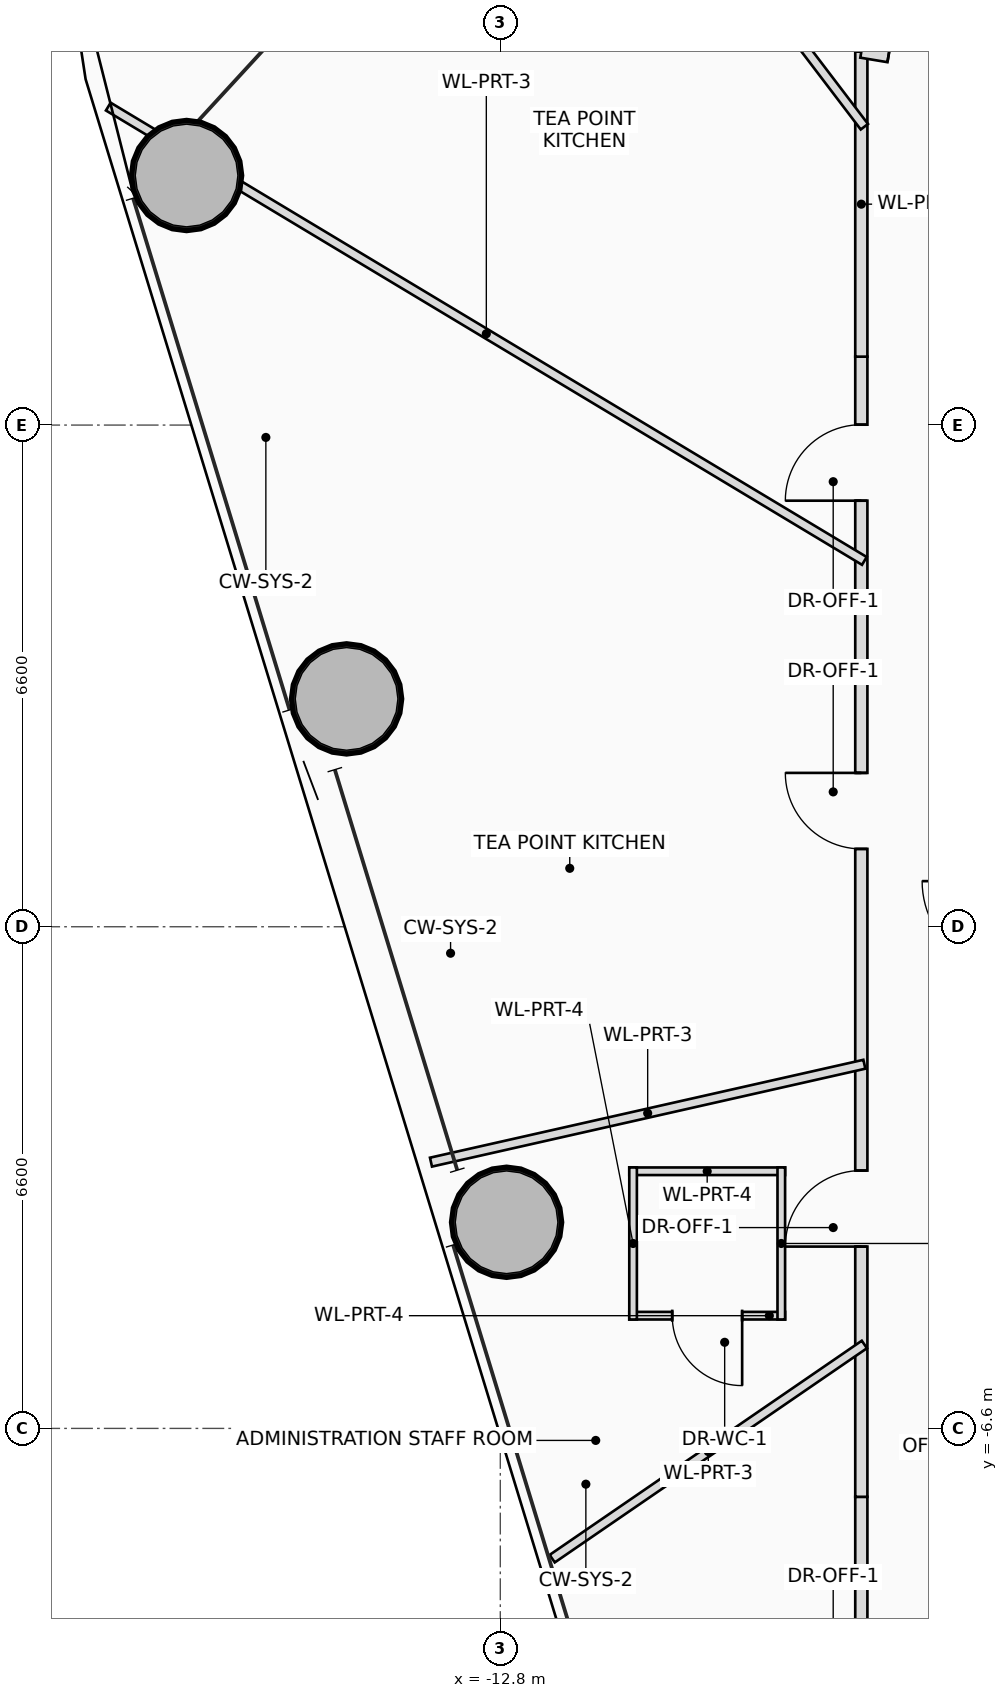
"""IFC4 building model, lengths in metres.
Left out: names, types, materials, properties, quantities, classifications, styles, units other than length and angle.
Written with IfcOpenShell. Run it as: python <this file> out.ifc"""

import sys

from ifc_helpers import new_model, si_unit, direction, frame, frame_2d, origin, origin_2d, place, context, subcontext, project, spatial, rectangle, hollow_circle, extrude, source, transform, mapped, element, fill, save


model = new_model("IFC4")
c1 = context("Model", 3, precision=1e-05, world=origin(), true_north=direction((0.0, 1.0)))
c2 = subcontext(c1, "Body", "Model", "MODEL_VIEW")
j1 = project(units=[si_unit("LENGTHUNIT", "METRE"), si_unit("PLANEANGLEUNIT", "RADIAN")], contexts=[c1])
p1 = place(None, origin())
s1 = spatial("IfcSite", under=j1, at=p1, CompositionType="ELEMENT")
p2 = place(p1, origin())
s2 = spatial("IfcBuilding", under=s1, at=p2, CompositionType="ELEMENT")
p3 = place(p2, frame((0.0, 0.0, 97.4)))
s3 = spatial("IfcBuildingStorey", under=s2, at=p3, CompositionType="ELEMENT", Elevation=97.4)
m1 = source(origin(), c2, "Body", "SweptSolid", [
    extrude(hollow_circle(Radius=0.725, WallThickness=0.05, at=origin_2d()), origin(), (0.0, 0.0, 1.0), 3.75),
])
for number, where, z_axis, x_axis in (
    (1, (-16.927, 9.883, 0.0), (0.0, 0.0, 1.0), (1.0, 0.0, 0.0)),
    (2, (-14.823, 2.998, 0.0), (0.0, 0.0, 1.0), (1.0, 0.0, 0.0)),
    (3, (-12.717, -3.888, 0.0), (0.0, 0.0, 1.0), (1.0, 0.0, 0.0)),
):
    element("IfcColumn", number, at=place(p3, frame(where, z_axis=z_axis, x_axis=x_axis)), inside=s3, PredefinedType="COLUMN", context=c2, shape_type="MappedRepresentation", body=[
        mapped(m1, transform((0.0, 0.0, 0.0), scale=1.0)),
    ])
p4 = place(p3, frame((-11.103, -3.217, 0.0), z_axis=(0.0, 0.0, 1.0), x_axis=(1.0, 0.0, 0.0)))
e4 = element("IfcWall", 4, at=p4, inside=s3, PredefinedType="PARTITIONING", context=c2, shape_type="SweptSolid", body=[
    extrude(rectangle(XDim=2.05, YDim=0.1, at=frame_2d((1.025, 0.0))), origin(), (0.0, 0.0, 1.0), 3.05),
])
p5 = place(p3, frame((-9.053, -5.117, 0.0), z_axis=(0.0, 0.0, 1.0), x_axis=(-1.0, 0.0, 0.0)))
e5 = element("IfcWall", 5, at=p5, inside=s3, PredefinedType="PARTITIONING", context=c2, shape_type="SweptSolid", body=[
    extrude(rectangle(XDim=2.05, YDim=0.1, at=frame_2d((1.025, 0.0))), origin(), (0.0, 0.0, 1.0), 3.05),
])
p6 = place(p5, frame((0.565, 0.0, 0.0)))
e6 = element("IfcOpeningElement", 6, at=p6, cuts=e5, PredefinedType="OPENING", context=c2, shape_type="SweptSolid", body=[
    extrude(rectangle(XDim=0.92, YDim=2.1, at=frame_2d((0.46, 1.05))), frame((0.0, 0.06, 0.0), z_axis=(0.0, -1.0, 0.0), x_axis=(1.0, 0.0, 0.0)), (0.0, 0.0, 1.0), 0.12),
])
for number, where, z_axis, x_axis in (
    (7, (-9.103, -3.167, 0.0), (0.0, 0.0, 1.0), (0.0, -1.0, 0.0)),
    (8, (-11.053, -5.167, 0.0), (0.0, 0.0, 1.0), (0.0, 1.0, 0.0)),
):
    element("IfcWall", number, at=place(p3, frame(where, z_axis=z_axis, x_axis=x_axis)), inside=s3, PredefinedType="PARTITIONING", context=c2, shape_type="SweptSolid", body=[
        extrude(rectangle(XDim=2.0, YDim=0.1, at=frame_2d((1.0, 0.0))), origin(), (0.0, 0.0, 1.0), 2.85),
    ])
p7 = place(p3, frame((-8.05, -13.271, 0.0), z_axis=(0.0, 0.0, 1.0), x_axis=(0.0, 1.0, 0.0)))
e9 = element("IfcWall", 9, at=p7, inside=s3, PredefinedType="PARTITIONING", context=c2, shape_type="SweptSolid", body=[
    extrude(rectangle(XDim=5.771, YDim=0.16, at=frame_2d((2.885, 0.0))), origin(), (0.0, 0.0, 1.0), 2.85),
])
p8 = place(p7, frame((2.385, 0.0, 0.0)))
e10 = element("IfcOpeningElement", 10, at=p8, cuts=e9, PredefinedType="OPENING", context=c2, shape_type="SweptSolid", body=[
    extrude(rectangle(XDim=1.0, YDim=2.25, at=frame_2d((0.5, 1.125))), frame((0.0, 0.09, 0.0), z_axis=(0.0, -1.0, 0.0), x_axis=(1.0, 0.0, 0.0)), (0.0, 0.0, 1.0), 0.18),
])
p9 = place(p3, frame((-8.05, -7.5, 0.0), z_axis=(0.0, 0.0, 1.0), x_axis=(0.0, 1.0, 0.0)))
e11 = element("IfcWall", 11, at=p9, inside=s3, PredefinedType="PARTITIONING", context=c2, shape_type="SweptSolid", body=[
    extrude(rectangle(XDim=15.0, YDim=0.16, at=frame_2d((7.5, 0.0))), origin(), (0.0, 0.0, 1.0), 2.85),
])
p10 = place(p9, frame((3.292, 0.0, 0.0)))
e12 = element("IfcOpeningElement", 12, at=p10, cuts=e11, PredefinedType="OPENING", context=c2, shape_type="SweptSolid", body=[
    extrude(rectangle(XDim=1.0, YDim=2.25, at=frame_2d((0.5, 1.125))), frame((0.0, 0.09, 0.0), z_axis=(0.0, -1.0, 0.0), x_axis=(1.0, 0.0, 0.0)), (0.0, 0.0, 1.0), 0.18),
])
p11 = place(p9, frame((8.524, 0.0, 0.0)))
e13 = element("IfcOpeningElement", 13, at=p11, cuts=e11, PredefinedType="OPENING", context=c2, shape_type="SweptSolid", body=[
    extrude(rectangle(XDim=1.0, YDim=2.25, at=frame_2d((0.5, 1.125))), frame((0.0, 0.09, 0.0), z_axis=(0.0, -1.0, 0.0), x_axis=(1.0, 0.0, 0.0)), (0.0, 0.0, 1.0), 0.18),
])
p12 = place(p9, frame((13.105, 0.0, 0.0)))
e14 = element("IfcOpeningElement", 14, at=p12, cuts=e11, PredefinedType="OPENING", context=c2, shape_type="SweptSolid", body=[
    extrude(rectangle(XDim=1.0, YDim=2.25, at=frame_2d((0.5, 1.125))), frame((0.0, 0.09, 0.0), z_axis=(0.0, -1.0, 0.0), x_axis=(1.0, 0.0, 0.0)), (0.0, 0.0, 1.0), 0.18),
])
p13 = place(p3, frame((-8.05, 7.5, 0.0), z_axis=(0.0, 0.0, 1.0), x_axis=(0.0, 1.0, 0.0)))
e15 = element("IfcWall", 15, at=p13, inside=s3, PredefinedType="PARTITIONING", context=c2, shape_type="SweptSolid", body=[
    extrude(rectangle(XDim=4.012, YDim=0.16, at=frame_2d((2.006, 0.0))), origin(), (0.0, 0.0, 1.0), 2.85),
])
p14 = place(p3, frame((-8.05, 11.512, 0.0), z_axis=(0.0, 0.0, 1.0), x_axis=(0.986405407683, -0.164330069354, 0.0)))
e16 = element("IfcWall", 16, at=p14, inside=s3, PredefinedType="PARTITIONING", context=c2, shape_type="SweptSolid", body=[
    extrude(rectangle(XDim=1.723, YDim=0.16, at=frame_2d((0.862, 0.0))), origin(), (0.0, 0.0, 1.0), 3.545),
])
p15 = place(p14, frame((0.362, 0.0, 0.0)))
e17 = element("IfcOpeningElement", 17, at=p15, cuts=e16, PredefinedType="OPENING", context=c2, shape_type="SweptSolid", body=[
    extrude(rectangle(XDim=1.0, YDim=2.25, at=frame_2d((0.5, 1.125))), frame((0.0, 0.09, 0.0), z_axis=(0.0, -1.0, 0.0), x_axis=(1.0, 0.0, 0.0)), (0.0, 0.0, 1.0), 0.18),
])
p16 = place(p3, frame((-8.01, 4.813, 0.0), z_axis=(0.0, 0.0, 1.0), x_axis=(-0.857173493242, 0.515027768653, 0.0)))
e18 = element("IfcWall", 18, at=p16, inside=s3, PredefinedType="PARTITIONING", context=c2, shape_type="SweptSolid", body=[
    extrude(rectangle(XDim=11.605, YDim=0.12, at=frame_2d((5.803, 0.0))), origin(), (0.0, 0.0, 1.0), 2.85),
])
p17 = place(p3, frame((-8.01, -1.809, 0.0), z_axis=(0.0, 0.0, 1.0), x_axis=(-0.975429422211, -0.220312147384, 0.0)))
e19 = element("IfcWall", 19, at=p17, inside=s3, PredefinedType="PARTITIONING", context=c2, shape_type="SweptSolid", body=[
    extrude(rectangle(XDim=5.845, YDim=0.12, at=frame_2d((2.923, 0.0))), origin(), (0.0, 0.0, 1.0), 3.01),
])
p18 = place(p3, frame((-8.01, -5.496, 0.0), z_axis=(0.0, 0.0, 1.0), x_axis=(-0.824586433319, -0.565735993186, 0.0)))
e20 = element("IfcWall", 20, at=p18, inside=s3, PredefinedType="PARTITIONING", context=c2, shape_type="SweptSolid", body=[
    extrude(rectangle(XDim=4.981, YDim=0.12, at=frame_2d((2.49, 0.0))), origin(), (0.0, 0.0, 1.0), 3.01),
])
p19 = place(p3, frame((-8.01, 10.525, 0.0), z_axis=(0.0, 0.0, 1.0), x_axis=(-0.605587414203, 0.79577879072, 0.0)))
e21 = element("IfcWall", 21, at=p19, inside=s3, PredefinedType="PARTITIONING", context=c2, shape_type="SweptSolid", body=[
    extrude(rectangle(XDim=4.972, YDim=0.12, at=frame_2d((2.486, 0.0))), origin(), (0.0, 0.0, 1.0), 3.01),
])
p20 = place(p6, origin())
e22 = element("IfcDoor", 22, at=p20, inside=s3, OperationType="SINGLE_SWING_LEFT", PredefinedType="DOOR", context=c2, shape_type="SweptSolid", body=[
    extrude(rectangle(XDim=0.92, YDim=2.1, at=frame_2d((0.46, 1.05))), frame((0.0, 0.025, 0.0), z_axis=(0.0, -1.0, 0.0), x_axis=(1.0, 0.0, 0.0)), (0.0, 0.0, 1.0), 0.05),
])
fill(e6, e22)
p21 = place(p10, origin())
e23 = element("IfcDoor", 23, at=p21, inside=s3, OperationType="SINGLE_SWING_LEFT", PredefinedType="DOOR", context=c2, shape_type="SweptSolid", body=[
    extrude(rectangle(XDim=1.0, YDim=2.25, at=frame_2d((0.5, 1.125))), frame((0.0, 0.025, 0.0), z_axis=(0.0, -1.0, 0.0), x_axis=(1.0, 0.0, 0.0)), (0.0, 0.0, 1.0), 0.05),
])
fill(e12, e23)
p22 = place(p11, origin())
e24 = element("IfcDoor", 24, at=p22, inside=s3, OperationType="SINGLE_SWING_RIGHT", PredefinedType="DOOR", context=c2, shape_type="SweptSolid", body=[
    extrude(rectangle(XDim=1.0, YDim=2.25, at=frame_2d((0.5, 1.125))), frame((0.0, 0.025, 0.0), z_axis=(0.0, -1.0, 0.0), x_axis=(1.0, 0.0, 0.0)), (0.0, 0.0, 1.0), 0.05),
])
fill(e13, e24)
p23 = place(p12, origin())
e25 = element("IfcDoor", 25, at=p23, inside=s3, OperationType="SINGLE_SWING_LEFT", PredefinedType="DOOR", context=c2, shape_type="SweptSolid", body=[
    extrude(rectangle(XDim=1.0, YDim=2.25, at=frame_2d((0.5, 1.125))), frame((0.0, 0.025, 0.0), z_axis=(0.0, -1.0, 0.0), x_axis=(1.0, 0.0, 0.0)), (0.0, 0.0, 1.0), 0.05),
])
fill(e14, e25)
p24 = place(p15, origin())
e26 = element("IfcDoor", 26, at=p24, inside=s3, OperationType="SINGLE_SWING_RIGHT", PredefinedType="DOOR", context=c2, shape_type="SweptSolid", body=[
    extrude(rectangle(XDim=1.0, YDim=2.25, at=frame_2d((0.5, 1.125))), frame((0.0, 0.025, 0.0), z_axis=(0.0, -1.0, 0.0), x_axis=(1.0, 0.0, 0.0)), (0.0, 0.0, 1.0), 0.05),
])
fill(e17, e26)
save(model, sys.argv[1])
